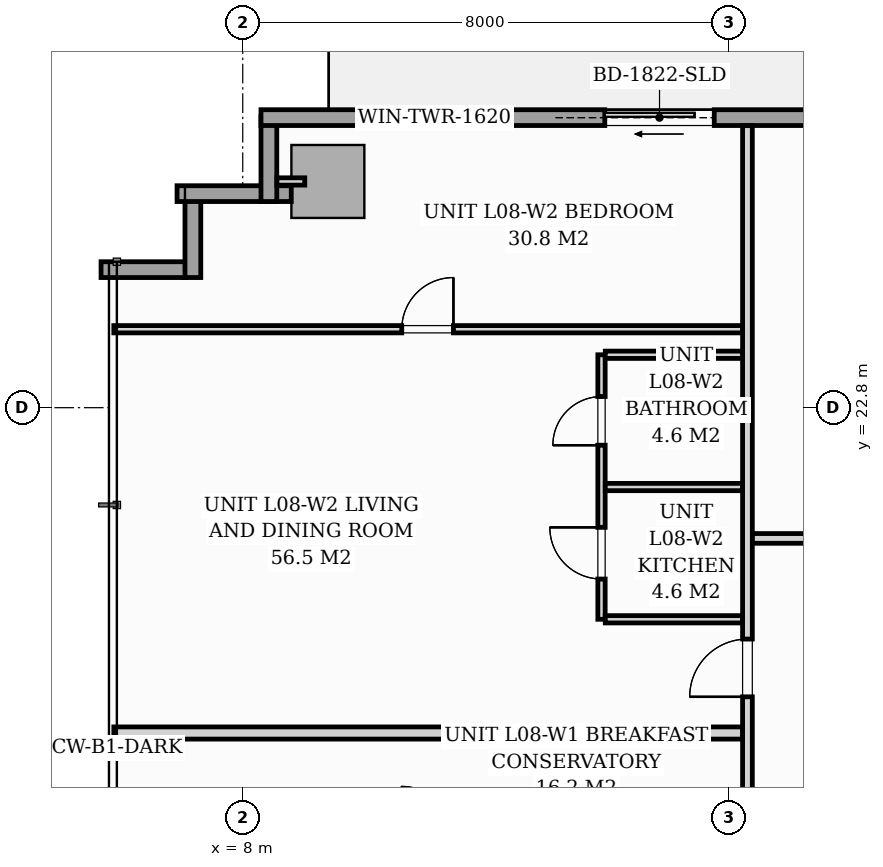
"""IFC4 building model, lengths in metres.
Left out: names, types, materials, properties, quantities, classifications, styles, units other than length and angle.
Written with IfcOpenShell. Run it as: python <this file> out.ifc"""

import sys

from ifc_helpers import new_model, si_unit, direction, frame, frame_2d, origin, origin_2d, place, context, subcontext, project, spatial, rectangle, extrude, source, transform, mapped, element, fill, save


model = new_model("IFC4")
c1 = context("Model", 3, precision=1e-05, world=origin(), true_north=direction((0.0, 1.0)))
c2 = subcontext(c1, "Body", "Model", "MODEL_VIEW")
j1 = project(units=[si_unit("LENGTHUNIT", "METRE"), si_unit("PLANEANGLEUNIT", "RADIAN")], contexts=[c1])
p1 = place(None, origin())
s1 = spatial("IfcSite", under=j1, at=p1, CompositionType="ELEMENT")
p2 = place(p1, origin())
s2 = spatial("IfcBuilding", under=s1, at=p2, CompositionType="ELEMENT")
p3 = place(p2, frame((0.0, 0.0, 32.6)))
s3 = spatial("IfcBuildingStorey", under=s2, at=p3, CompositionType="ELEMENT", Elevation=32.6)
m1 = source(origin(), c2, "Body", "SweptSolid", [
    extrude(rectangle(XDim=1.2, YDim=1.2, at=origin_2d()), origin(), (0.0, 0.0, 1.0), 3.196),
])
p4 = place(p3, frame((9.4, 26.52, 0.002), z_axis=(0.0, 0.0, 1.0), x_axis=(1.0, 0.0, 0.0)))
e1 = element("IfcColumn", 1, at=p4, inside=s3, PredefinedType="COLUMN", context=c2, shape_type="MappedRepresentation", body=[
    mapped(m1, transform((0.0, 0.0, 0.0), scale=1.0)),
])
for number, where, z_axis, x_axis in (
    (2, (5.67, 25.07, 0.0), (0.0, 0.0, 1.0), (1.0, 0.0, 0.0)),
    (3, (7.18, 24.94, 0.0), (0.0, 0.0, 1.0), (0.0, 1.0, 0.0)),
):
    element("IfcWall", number, at=place(p3, frame(where, z_axis=z_axis, x_axis=x_axis)), inside=s3, PredefinedType="STANDARD", context=c2, shape_type="SweptSolid", body=[
        extrude(rectangle(XDim=1.395, YDim=0.26, at=frame_2d((0.698, 0.0))), origin(), (0.0, 0.0, 1.0), 2.94),
    ])
p5 = place(p3, frame((6.92, 26.32, 0.0), z_axis=(0.0, 0.0, 1.0), x_axis=(1.0, 0.0, 0.0)))
e4 = element("IfcWall", 4, at=p5, inside=s3, PredefinedType="STANDARD", context=c2, shape_type="SweptSolid", body=[
    extrude(rectangle(XDim=1.878, YDim=0.26, at=frame_2d((0.939, 0.0))), origin(), (0.0, 0.0, 1.0), 2.94),
])
p6 = place(p3, frame((8.43, 26.19, 0.0), z_axis=(0.0, 0.0, 1.0), x_axis=(0.0, 1.0, 0.0)))
e5 = element("IfcWall", 5, at=p6, inside=s3, PredefinedType="STANDARD", context=c2, shape_type="SweptSolid", body=[
    extrude(rectangle(XDim=1.395, YDim=0.26, at=frame_2d((0.698, 0.0))), origin(), (0.0, 0.0, 1.0), 2.94),
])
p7 = place(p3, frame((8.3, 27.57, 0.0), z_axis=(0.0, 0.0, 1.0), x_axis=(1.0, 0.0, 0.0)))
e6 = element("IfcWall", 6, at=p7, inside=s3, PredefinedType="STANDARD", context=c2, shape_type="SweptSolid", body=[
    extrude(rectangle(XDim=17.15, YDim=0.26, at=frame_2d((8.575, 0.0))), origin(), (0.0, 0.0, 1.0), 2.94),
])
p8 = place(p7, frame((5.654, 0.0, 0.0)))
e7 = element("IfcOpeningElement", 7, at=p8, cuts=e6, PredefinedType="OPENING", context=c2, shape_type="SweptSolid", body=[
    extrude(rectangle(XDim=1.8, YDim=2.06, at=frame_2d((0.9, 1.03))), frame((0.0, 0.14, 0.0), z_axis=(0.0, -1.0, 0.0), x_axis=(1.0, 0.0, 0.0)), (0.0, 0.0, 1.0), 0.28),
])
p9 = place(p7, frame((2.05, 0.0, 0.65)))
e8 = element("IfcOpeningElement", 8, at=p9, cuts=e6, PredefinedType="OPENING", context=c2, shape_type="SweptSolid", body=[
    extrude(rectangle(XDim=1.6, YDim=1.5, at=frame_2d((0.8, 0.75))), frame((0.0, 0.14, 0.0), z_axis=(0.0, -1.0, 0.0), x_axis=(1.0, 0.0, 0.0)), (0.0, 0.0, 1.0), 0.28),
])
p10 = place(p3, frame((16.3, 12.572, 0.0), z_axis=(0.0, 0.0, 1.0), x_axis=(0.0, 1.0, 0.0)))
e9 = element("IfcWall", 9, at=p10, inside=s3, PredefinedType="PARTITIONING", context=c2, shape_type="SweptSolid", body=[
    extrude(rectangle(XDim=14.866, YDim=0.16, at=frame_2d((7.433, 0.0))), origin(), (0.0, 0.0, 1.0), 2.94),
])
p11 = place(p10, frame((0.493, 0.0, 0.0)))
e10 = element("IfcOpeningElement", 10, at=p11, cuts=e9, PredefinedType="OPENING", context=c2, shape_type="SweptSolid", body=[
    extrude(rectangle(XDim=0.95, YDim=2.06, at=frame_2d((0.475, 1.03))), frame((0.0, 0.09, 0.0), z_axis=(0.0, -1.0, 0.0), x_axis=(1.0, 0.0, 0.0)), (0.0, 0.0, 1.0), 0.18),
])
p12 = place(p10, frame((5.473, 0.0, 0.0)))
e11 = element("IfcOpeningElement", 11, at=p12, cuts=e9, PredefinedType="OPENING", context=c2, shape_type="SweptSolid", body=[
    extrude(rectangle(XDim=0.95, YDim=2.06, at=frame_2d((0.475, 1.03))), frame((0.0, 0.09, 0.0), z_axis=(0.0, -1.0, 0.0), x_axis=(1.0, 0.0, 0.0)), (0.0, 0.0, 1.0), 0.18),
])
p13 = place(p3, frame((5.88, 17.45, 0.0), z_axis=(0.0, 0.0, 1.0), x_axis=(1.0, 0.0, 0.0)))
e12 = element("IfcWall", 12, at=p13, inside=s3, PredefinedType="PARTITIONING", context=c2, shape_type="SweptSolid", body=[
    extrude(rectangle(XDim=10.338, YDim=0.2, at=frame_2d((5.169, 0.0))), origin(), (0.0, 0.0, 1.0), 2.94),
])
p14 = place(p3, frame((13.9, 19.32, 0.0), z_axis=(0.0, 0.0, 1.0), x_axis=(0.0, 1.0, 0.0)))
e13 = element("IfcWall", 13, at=p14, inside=s3, PredefinedType="PARTITIONING", context=c2, shape_type="SweptSolid", body=[
    extrude(rectangle(XDim=4.35, YDim=0.12, at=frame_2d((2.175, 0.0))), origin(), (0.0, 0.0, 1.0), 2.94),
])
p15 = place(p14, frame((0.662, 0.0, 0.0)))
e14 = element("IfcOpeningElement", 14, at=p15, cuts=e13, PredefinedType="OPENING", context=c2, shape_type="SweptSolid", body=[
    extrude(rectangle(XDim=0.85, YDim=2.05, at=frame_2d((0.425, 1.025))), frame((0.0, 0.07, 0.0), z_axis=(0.0, -1.0, 0.0), x_axis=(1.0, 0.0, 0.0)), (0.0, 0.0, 1.0), 0.14),
])
p16 = place(p14, frame((2.863, 0.0, 0.0)))
e15 = element("IfcOpeningElement", 15, at=p16, cuts=e13, PredefinedType="OPENING", context=c2, shape_type="SweptSolid", body=[
    extrude(rectangle(XDim=0.8, YDim=2.02, at=frame_2d((0.4, 1.01))), frame((0.0, 0.07, 0.0), z_axis=(0.0, -1.0, 0.0), x_axis=(1.0, 0.0, 0.0)), (0.0, 0.0, 1.0), 0.14),
])
for number, where, z_axis, x_axis in (
    (16, (13.962, 21.495, 0.0), (0.0, 0.0, 1.0), (1.0, 0.0, 0.0)),
    (17, (13.962, 19.32, 0.0), (0.0, 0.0, 1.0), (1.0, 0.0, 0.0)),
    (18, (13.962, 23.67, 0.0), (0.0, 0.0, 1.0), (1.0, 0.0, 0.0)),
):
    element("IfcWall", number, at=place(p3, frame(where, z_axis=z_axis, x_axis=x_axis)), inside=s3, PredefinedType="PARTITIONING", context=c2, shape_type="SweptSolid", body=[
        extrude(rectangle(XDim=2.256, YDim=0.12, at=frame_2d((1.128, 0.0))), origin(), (0.0, 0.0, 1.0), 2.94),
    ])
p17 = place(p3, frame((5.88, 24.09, 0.0), z_axis=(0.0, 0.0, 1.0), x_axis=(1.0, 0.0, 0.0)))
e19 = element("IfcWall", 19, at=p17, inside=s3, PredefinedType="PARTITIONING", context=c2, shape_type="SweptSolid", body=[
    extrude(rectangle(XDim=10.338, YDim=0.12, at=frame_2d((5.169, 0.0))), origin(), (0.0, 0.0, 1.0), 2.94),
])
p18 = place(p17, frame((4.735, 0.0, 0.0)))
e20 = element("IfcOpeningElement", 20, at=p18, cuts=e19, PredefinedType="OPENING", context=c2, shape_type="SweptSolid", body=[
    extrude(rectangle(XDim=0.85, YDim=2.05, at=frame_2d((0.425, 1.025))), frame((0.0, 0.07, 0.0), z_axis=(0.0, -1.0, 0.0), x_axis=(1.0, 0.0, 0.0)), (0.0, 0.0, 1.0), 0.14),
])
p19 = place(p3, frame((16.382, 20.65, 0.0), z_axis=(0.0, 0.0, 1.0), x_axis=(1.0, 0.0, 0.0)))
e21 = element("IfcWall", 21, at=p19, inside=s3, PredefinedType="PARTITIONING", context=c2, shape_type="SweptSolid", body=[
    extrude(rectangle(XDim=1.786, YDim=0.16, at=frame_2d((0.893, 0.0))), origin(), (0.0, 0.0, 1.0), 2.94),
])
p20 = place(p3, frame((9.02, 26.52, 0.0), z_axis=(0.0, 0.0, 1.0), x_axis=(-1.0, 0.0, 0.0)))
e22 = element("IfcWall", 22, at=p20, inside=s3, PredefinedType="PARTITIONING", context=c2, shape_type="SweptSolid", body=[
    extrude(rectangle(XDim=0.458, YDim=0.12, at=frame_2d((0.229, 0.0))), origin(), (0.0, 0.0, 1.0), 2.94),
])
m2 = source(origin(), c2, "Body", "SweptSolid", [
    extrude(rectangle(XDim=1.8, YDim=2.06, at=frame_2d((0.9, 1.03))), frame((0.0, 0.025, 0.0), z_axis=(0.0, -1.0, 0.0), x_axis=(1.0, 0.0, 0.0)), (0.0, 0.0, 1.0), 0.05),
])
p21 = place(p8, origin())
e23 = element("IfcDoor", 23, at=p21, inside=s3, OperationType="SLIDING_TO_LEFT", PredefinedType="DOOR", context=c2, shape_type="MappedRepresentation", body=[
    mapped(m2, transform((0.0, 0.0, 0.0), scale=1.0)),
])
fill(e7, e23)
m3 = source(origin(), c2, "Body", "SweptSolid", [
    extrude(rectangle(XDim=1.6, YDim=1.5, at=frame_2d((0.8, 0.75))), frame((0.0, 0.03, 0.0), z_axis=(0.0, -1.0, 0.0), x_axis=(1.0, 0.0, 0.0)), (0.0, 0.0, 1.0), 0.06),
])
p22 = place(p9, origin())
e24 = element("IfcWindow", 24, at=p22, inside=s3, PartitioningType="SINGLE_PANEL", PredefinedType="WINDOW", context=c2, shape_type="MappedRepresentation", body=[
    mapped(m3, transform((0.0, 0.0, 0.0), scale=1.0)),
])
fill(e8, e24)
m4 = source(origin(), c2, "Body", "SweptSolid", [
    extrude(rectangle(XDim=0.95, YDim=2.06, at=frame_2d((0.475, 1.03))), frame((0.0, 0.025, 0.0), z_axis=(0.0, -1.0, 0.0), x_axis=(1.0, 0.0, 0.0)), (0.0, 0.0, 1.0), 0.05),
])
p23 = place(p12, origin())
e25 = element("IfcDoor", 25, at=p23, inside=s3, OperationType="SINGLE_SWING_LEFT", PredefinedType="DOOR", context=c2, shape_type="MappedRepresentation", body=[
    mapped(m4, transform((0.0, 0.0, 0.0), scale=1.0)),
])
fill(e11, e25)
m5 = source(origin(), c2, "Body", "SweptSolid", [
    extrude(rectangle(XDim=0.85, YDim=2.05, at=frame_2d((0.425, 1.025))), frame((0.0, 0.025, 0.0), z_axis=(0.0, -1.0, 0.0), x_axis=(1.0, 0.0, 0.0)), (0.0, 0.0, 1.0), 0.05),
])
p24 = place(p15, origin())
e26 = element("IfcDoor", 26, at=p24, inside=s3, OperationType="SINGLE_SWING_RIGHT", PredefinedType="DOOR", context=c2, shape_type="MappedRepresentation", body=[
    mapped(m5, transform((0.0, 0.0, 0.0), scale=1.0)),
])
fill(e14, e26)
m6 = source(origin(), c2, "Body", "SweptSolid", [
    extrude(rectangle(XDim=0.8, YDim=2.02, at=frame_2d((0.4, 1.01))), frame((0.0, 0.025, 0.0), z_axis=(0.0, -1.0, 0.0), x_axis=(1.0, 0.0, 0.0)), (0.0, 0.0, 1.0), 0.05),
])
p25 = place(p16, origin())
e27 = element("IfcDoor", 27, at=p25, inside=s3, OperationType="SINGLE_SWING_LEFT", PredefinedType="DOOR", context=c2, shape_type="MappedRepresentation", body=[
    mapped(m6, transform((0.0, 0.0, 0.0), scale=1.0)),
])
fill(e15, e27)
p26 = place(p18, origin())
e28 = element("IfcDoor", 28, at=p26, inside=s3, OperationType="SINGLE_SWING_RIGHT", PredefinedType="DOOR", context=c2, shape_type="MappedRepresentation", body=[
    mapped(m5, transform((0.0, 0.0, 0.0), scale=1.0)),
])
fill(e20, e28)
save(model, sys.argv[1])
